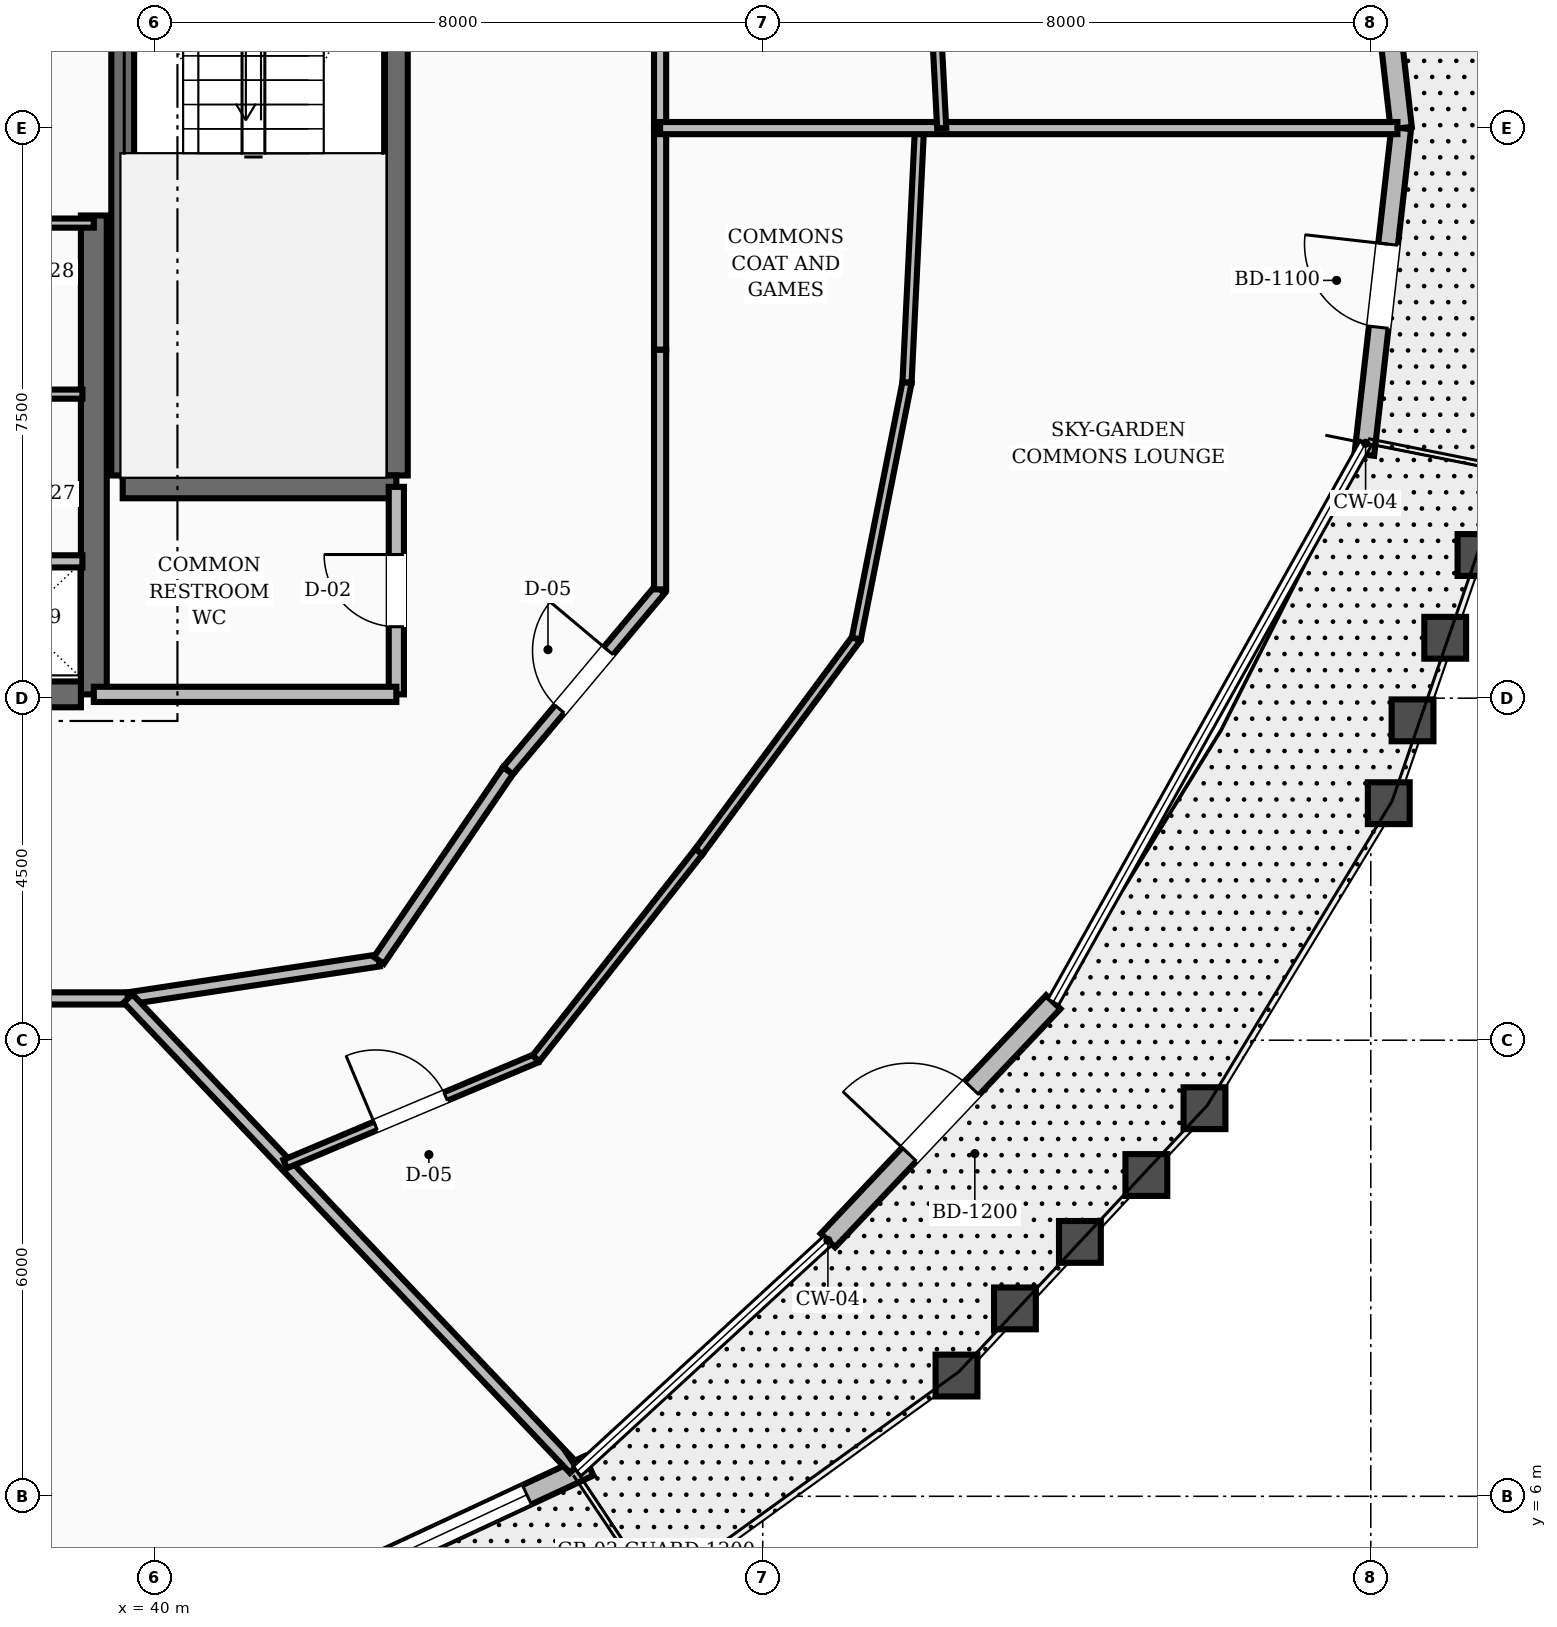
"""IFC4 building model, lengths in metres.
Left out: names, types, materials, properties, quantities, classifications, styles, units other than length and angle.
Written with IfcOpenShell. Run it as: python <this file> out.ifc"""

import sys

from ifc_helpers import new_model, si_unit, direction, frame, frame_2d, origin, place, context, subcontext, project, spatial, rectangle, extrude, element, fill, save


model = new_model("IFC4")
c1 = context("Model", 3, precision=1e-05, world=origin(), true_north=direction((0.0, 1.0)))
c2 = subcontext(c1, "Body", "Model", "MODEL_VIEW")
j1 = project(units=[si_unit("LENGTHUNIT", "METRE"), si_unit("PLANEANGLEUNIT", "RADIAN")], contexts=[c1])
p1 = place(None, origin())
s1 = spatial("IfcSite", under=j1, at=p1, CompositionType="ELEMENT")
p2 = place(p1, origin())
s2 = spatial("IfcBuilding", under=s1, at=p2, CompositionType="ELEMENT")
p3 = place(p2, frame((0.0, 0.0, 200.0)))
s3 = spatial("IfcBuildingStorey", under=s2, at=p3, CompositionType="ELEMENT", Elevation=200.0)
p4 = place(p3, frame((39.2, 16.55, 0.0), z_axis=(0.0, 0.0, 1.0), x_axis=(0.0, 1.0, 0.0)))
e1 = element("IfcWall", 1, at=p4, inside=s3, PredefinedType="SHEAR", context=c2, shape_type="SweptSolid", body=[
    extrude(rectangle(XDim=6.3, YDim=0.34, at=frame_2d((3.15, 0.0))), origin(), (0.0, 0.0, 1.0), 3.6),
])
p5 = place(p3, frame((35.8, 16.55, 0.0), z_axis=(0.0, 0.0, 1.0), x_axis=(1.0, 0.0, 0.0)))
e2 = element("IfcWall", 2, at=p5, inside=s3, PredefinedType="SHEAR", context=c2, shape_type="SweptSolid", body=[
    extrude(rectangle(XDim=3.23, YDim=0.34, at=frame_2d((1.615, 0.0))), origin(), (0.0, 0.0, 1.0), 3.6),
])
p6 = place(p5, frame((0.3, 0.0, 0.0)))
e3 = element("IfcOpeningElement", 3, at=p6, cuts=e2, PredefinedType="OPENING", context=c2, shape_type="SweptSolid", body=[
    extrude(rectangle(XDim=1.1, YDim=2.1, at=frame_2d((0.55, 1.05))), frame((0.0, 0.18, 0.0), z_axis=(0.0, -1.0, 0.0), x_axis=(1.0, 0.0, 0.0)), (0.0, 0.0, 1.0), 0.36),
])
for number, where, z_axis, x_axis in (
    (4, (43.18, 19.43, 0.0), (0.0, 0.0, 1.0), (0.0, 1.0, 0.0)),
    (5, (39.58, 19.43, 0.0), (0.0, 0.0, 1.0), (0.0, 1.0, 0.0)),
):
    element("IfcWall", number, at=place(p3, frame(where, z_axis=z_axis, x_axis=x_axis)), inside=s3, PredefinedType="SHEAR", context=c2, shape_type="SweptSolid", body=[
        extrude(rectangle(XDim=8.74, YDim=0.3, at=frame_2d((4.37, 0.0))), origin(), (0.0, 0.0, 1.0), 3.6),
    ])
p7 = place(p3, frame((39.58, 19.28, 0.0), z_axis=(0.0, 0.0, 1.0), x_axis=(1.0, 0.0, 0.0)))
e6 = element("IfcWall", 6, at=p7, inside=s3, PredefinedType="SHEAR", context=c2, shape_type="SweptSolid", body=[
    extrude(rectangle(XDim=3.6, YDim=0.3, at=frame_2d((1.8, 0.0))), origin(), (0.0, 0.0, 1.0), 3.6),
])
p8 = place(p3, frame((56.4, 24.0, 0.0), z_axis=(0.0, 0.0, 1.0), x_axis=(-0.112325534702, 0.99367146193, 0.0)))
e7 = element("IfcWall", 7, at=p8, inside=s3, PredefinedType="STANDARD", context=c2, shape_type="SweptSolid", body=[
    extrude(rectangle(XDim=4.173, YDim=0.28, at=frame_2d((2.086, 0.0))), origin(), (0.0, 0.0, 1.0), 2.77),
])
p9 = place(p3, frame((41.338, 4.363, 0.0), z_axis=(0.0, 0.0, 1.0), x_axis=(0.906549700707, 0.422099088068, 0.0)))
e8 = element("IfcWall", 8, at=p9, inside=s3, PredefinedType="STANDARD", context=c2, shape_type="SweptSolid", body=[
    extrude(rectangle(XDim=4.828, YDim=0.28, at=frame_2d((2.414, 0.0))), origin(), (0.0, 0.0, 1.0), 2.77),
])
p10 = place(p9, frame((0.727, 0.0, 0.8)))
e9 = element("IfcOpeningElement", 9, at=p10, cuts=e8, PredefinedType="OPENING", context=c2, shape_type="SweptSolid", body=[
    extrude(rectangle(XDim=3.2, YDim=1.65, at=frame_2d((1.6, 0.825))), frame((0.0, 0.15, 0.0), z_axis=(0.0, -1.0, 0.0), x_axis=(1.0, 0.0, 0.0)), (0.0, 0.0, 1.0), 0.3),
])
p11 = place(p3, frame((48.858, 9.366, 0.0), z_axis=(0.0, 0.0, 1.0), x_axis=(0.686972279874, 0.726683622139, 0.0)))
e10 = element("IfcWall", 10, at=p11, inside=s3, PredefinedType="STANDARD", context=c2, shape_type="SweptSolid", body=[
    extrude(rectangle(XDim=4.316, YDim=0.26, at=frame_2d((2.158, 0.0))), origin(), (0.0, 0.0, 1.0), 2.77),
])
p12 = place(p11, frame((1.558, 0.0, 0.0)))
e11 = element("IfcOpeningElement", 11, at=p12, cuts=e10, PredefinedType="OPENING", context=c2, shape_type="SweptSolid", body=[
    extrude(rectangle(XDim=1.2, YDim=2.15, at=frame_2d((0.6, 1.075))), frame((0.0, 0.14, 0.0), z_axis=(0.0, -1.0, 0.0), x_axis=(1.0, 0.0, 0.0)), (0.0, 0.0, 1.0), 0.28),
])
p13 = place(p3, frame((55.915, 19.703, 0.0), z_axis=(0.0, 0.0, 1.0), x_axis=(0.112302837685, 0.993674027359, 0.0)))
e12 = element("IfcWall", 12, at=p13, inside=s3, PredefinedType="STANDARD", context=c2, shape_type="SweptSolid", body=[
    extrude(rectangle(XDim=4.324, YDim=0.26, at=frame_2d((2.162, 0.0))), origin(), (0.0, 0.0, 1.0), 2.77),
])
p14 = place(p13, frame((1.688, 0.0, 0.0)))
e13 = element("IfcOpeningElement", 13, at=p14, cuts=e12, PredefinedType="OPENING", context=c2, shape_type="SweptSolid", body=[
    extrude(rectangle(XDim=1.1, YDim=2.15, at=frame_2d((0.55, 1.075))), frame((0.0, 0.14, 0.0), z_axis=(0.0, -1.0, 0.0), x_axis=(1.0, 0.0, 0.0)), (0.0, 0.0, 1.0), 0.28),
])
p15 = place(p3, frame((43.18, 16.55, 0.0), z_axis=(0.0, 0.0, 1.0), x_axis=(0.0, 1.0, 0.0)))
e14 = element("IfcWall", 14, at=p15, inside=s3, PredefinedType="SOLIDWALL", context=c2, shape_type="SweptSolid", body=[
    extrude(rectangle(XDim=2.73, YDim=0.2, at=frame_2d((1.365, 0.0))), origin(), (0.0, 0.0, 1.0), 2.75),
])
p16 = place(p15, frame((0.89, 0.0, 0.0)))
e15 = element("IfcOpeningElement", 15, at=p16, cuts=e14, PredefinedType="OPENING", context=c2, shape_type="SweptSolid", body=[
    extrude(rectangle(XDim=0.95, YDim=2.1, at=frame_2d((0.475, 1.05))), frame((0.0, 0.11, 0.0), z_axis=(0.0, -1.0, 0.0), x_axis=(1.0, 0.0, 0.0)), (0.0, 0.0, 1.0), 0.22),
])
p17 = place(p3, frame((39.2, 16.55, 0.0), z_axis=(0.0, 0.0, 1.0), x_axis=(1.0, 0.0, 0.0)))
e16 = element("IfcWall", 16, at=p17, inside=s3, PredefinedType="SOLIDWALL", context=c2, shape_type="SweptSolid", body=[
    extrude(rectangle(XDim=3.98, YDim=0.2, at=frame_2d((1.99, 0.0))), origin(), (0.0, 0.0, 1.0), 2.75),
])
p18 = place(p3, frame((37.4, 18.3, 0.0), z_axis=(0.0, 0.0, 1.0), x_axis=(1.0, 0.0, 0.0)))
e17 = element("IfcWall", 17, at=p18, inside=s3, PredefinedType="SOLIDWALL", context=c2, shape_type="SweptSolid", body=[
    extrude(rectangle(XDim=1.65, YDim=0.16, at=frame_2d((0.825, 0.0))), origin(), (0.0, 0.0, 1.0), 2.75),
])
p19 = place(p3, frame((37.4, 22.75, 0.0), z_axis=(0.0, 0.0, 1.0), x_axis=(1.0, 0.0, 0.0)))
e18 = element("IfcWall", 18, at=p19, inside=s3, PredefinedType="PARTITIONING", context=c2, shape_type="SweptSolid", body=[
    extrude(rectangle(XDim=1.8, YDim=0.12, at=frame_2d((0.9, 0.0))), origin(), (0.0, 0.0, 1.0), 2.75),
])
p20 = place(p3, frame((37.4, 20.5, 0.0), z_axis=(0.0, 0.0, 1.0), x_axis=(1.0, 0.0, 0.0)))
e19 = element("IfcWall", 19, at=p20, inside=s3, PredefinedType="PARTITIONING", context=c2, shape_type="SweptSolid", body=[
    extrude(rectangle(XDim=1.65, YDim=0.12, at=frame_2d((0.825, 0.0))), origin(), (0.0, 0.0, 1.0), 2.75),
])
p21 = place(p3, frame((46.65, 24.0, 0.0), z_axis=(0.0, 0.0, 1.0), x_axis=(0.0, 1.0, 0.0)))
e20 = element("IfcWall", 20, at=p21, inside=s3, PredefinedType="SOLIDWALL", context=c2, shape_type="SweptSolid", body=[
    extrude(rectangle(XDim=2.914, YDim=0.16, at=frame_2d((1.457, 0.0))), origin(), (0.0, 0.0, 1.0), 2.75),
])
p22 = place(p3, frame((36.743, 12.55, 0.0), z_axis=(0.0, 0.0, 1.0), x_axis=(1.0, 0.0, 0.0)))
e21 = element("IfcWall", 21, at=p22, inside=s3, PredefinedType="SOLIDWALL", context=c2, shape_type="SweptSolid", body=[
    extrude(rectangle(XDim=2.908, YDim=0.16, at=frame_2d((1.454, 0.0))), origin(), (0.0, 0.0, 1.0), 2.75),
])
p23 = place(p3, frame((39.651, 12.55, 0.0), z_axis=(0.0, 0.0, 1.0), x_axis=(0.988710906508, 0.149835721217, 0.0)))
e22 = element("IfcWall", 22, at=p23, inside=s3, PredefinedType="SOLIDWALL", context=c2, shape_type="SweptSolid", body=[
    extrude(rectangle(XDim=3.337, YDim=0.16, at=frame_2d((1.668, 0.0))), origin(), (0.0, 0.0, 1.0), 2.75),
])
p24 = place(p3, frame((42.95, 13.05, 0.0), z_axis=(0.0, 0.0, 1.0), x_axis=(0.562674669208, 0.826678423955, 0.0)))
e23 = element("IfcWall", 23, at=p24, inside=s3, PredefinedType="SOLIDWALL", context=c2, shape_type="SweptSolid", body=[
    extrude(rectangle(XDim=3.021, YDim=0.16, at=frame_2d((1.511, 0.0))), origin(), (0.0, 0.0, 1.0), 2.75),
])
p25 = place(p3, frame((44.65, 15.548, 0.0), z_axis=(0.0, 0.0, 1.0), x_axis=(0.642665742791, 0.76614668507, 0.0)))
e24 = element("IfcWall", 24, at=p25, inside=s3, PredefinedType="SOLIDWALL", context=c2, shape_type="SweptSolid", body=[
    extrude(rectangle(XDim=3.112, YDim=0.16, at=frame_2d((1.556, 0.0))), origin(), (0.0, 0.0, 1.0), 2.75),
])
p26 = place(p25, frame((1.056, 0.0, 0.0)))
e25 = element("IfcOpeningElement", 25, at=p26, cuts=e24, PredefinedType="OPENING", context=c2, shape_type="SweptSolid", body=[
    extrude(rectangle(XDim=1.0, YDim=2.1, at=frame_2d((0.5, 1.05))), frame((0.0, 0.09, 0.0), z_axis=(0.0, -1.0, 0.0), x_axis=(1.0, 0.0, 0.0)), (0.0, 0.0, 1.0), 0.18),
])
p27 = place(p3, frame((46.65, 17.932, 0.0), z_axis=(0.0, 0.0, 1.0), x_axis=(0.0, 1.0, 0.0)))
e26 = element("IfcWall", 26, at=p27, inside=s3, PredefinedType="SOLIDWALL", context=c2, shape_type="SweptSolid", body=[
    extrude(rectangle(XDim=3.154, YDim=0.16, at=frame_2d((1.577, 0.0))), origin(), (0.0, 0.0, 1.0), 2.75),
])
p28 = place(p3, frame((46.65, 21.086, 0.0), z_axis=(0.0, 0.0, 1.0), x_axis=(0.0, 1.0, 0.0)))
e27 = element("IfcWall", 27, at=p28, inside=s3, PredefinedType="SOLIDWALL", context=c2, shape_type="SweptSolid", body=[
    extrude(rectangle(XDim=2.914, YDim=0.16, at=frame_2d((1.457, 0.0))), origin(), (0.0, 0.0, 1.0), 2.75),
])
p29 = place(p3, frame((39.651, 12.55, 0.0), z_axis=(0.0, 0.0, 1.0), x_axis=(0.688358927094, -0.725370241662, 0.0)))
e28 = element("IfcWall", 28, at=p29, inside=s3, PredefinedType="SOLIDWALL", context=c2, shape_type="SweptSolid", body=[
    extrude(rectangle(XDim=8.529, YDim=0.16, at=frame_2d((4.265, 0.0))), origin(), (0.0, 0.0, 1.0), 2.75),
])
p30 = place(p3, frame((41.718, 10.372, 0.0), z_axis=(0.0, 0.0, 1.0), x_axis=(0.921693123921, 0.387919818154, 0.0)))
e29 = element("IfcWall", 29, at=p30, inside=s3, PredefinedType="PARTITIONING", context=c2, shape_type="SweptSolid", body=[
    extrude(rectangle(XDim=3.58, YDim=0.12, at=frame_2d((1.79, 0.0))), origin(), (0.0, 0.0, 1.0), 2.75),
])
p31 = place(p30, frame((1.29, 0.0, 0.0)))
e30 = element("IfcOpeningElement", 30, at=p31, cuts=e29, PredefinedType="OPENING", context=c2, shape_type="SweptSolid", body=[
    extrude(rectangle(XDim=1.0, YDim=2.1, at=frame_2d((0.5, 1.05))), frame((0.0, 0.07, 0.0), z_axis=(0.0, -1.0, 0.0), x_axis=(1.0, 0.0, 0.0)), (0.0, 0.0, 1.0), 0.14),
])
p32 = place(p3, frame((45.018, 11.761, 0.0), z_axis=(0.0, 0.0, 1.0), x_axis=(0.618702194265, 0.785625607278, 0.0)))
e31 = element("IfcWall", 31, at=p32, inside=s3, PredefinedType="PARTITIONING", context=c2, shape_type="SweptSolid", body=[
    extrude(rectangle(XDim=3.463, YDim=0.12, at=frame_2d((1.732, 0.0))), origin(), (0.0, 0.0, 1.0), 2.75),
])
p33 = place(p3, frame((47.16, 14.482, 0.0), z_axis=(0.0, 0.0, 1.0), x_axis=(0.594391061084, 0.804176141466, 0.0)))
e32 = element("IfcWall", 32, at=p33, inside=s3, PredefinedType="PARTITIONING", context=c2, shape_type="SweptSolid", body=[
    extrude(rectangle(XDim=3.484, YDim=0.12, at=frame_2d((1.742, 0.0))), origin(), (0.0, 0.0, 1.0), 2.75),
])
p34 = place(p3, frame((49.231, 17.284, 0.0), z_axis=(0.0, 0.0, 1.0), x_axis=(0.194175580381, 0.980966790459, 0.0)))
e33 = element("IfcWall", 33, at=p34, inside=s3, PredefinedType="PARTITIONING", context=c2, shape_type="SweptSolid", body=[
    extrude(rectangle(XDim=3.436, YDim=0.12, at=frame_2d((1.718, 0.0))), origin(), (0.0, 0.0, 1.0), 2.75),
])
p35 = place(p3, frame((49.899, 20.655, 0.0), z_axis=(0.0, 0.0, 1.0), x_axis=(0.048981492316, 0.998799686329, 0.0)))
e34 = element("IfcWall", 34, at=p35, inside=s3, PredefinedType="PARTITIONING", context=c2, shape_type="SweptSolid", body=[
    extrude(rectangle(XDim=3.349, YDim=0.12, at=frame_2d((1.675, 0.0))), origin(), (0.0, 0.0, 1.0), 2.75),
])
p36 = place(p3, frame((46.65, 24.0, 0.0), z_axis=(0.0, 0.0, 1.0), x_axis=(1.0, 0.0, 0.0)))
e35 = element("IfcWall", 35, at=p36, inside=s3, PredefinedType="SOLIDWALL", context=c2, shape_type="SweptSolid", body=[
    extrude(rectangle(XDim=9.701, YDim=0.16, at=frame_2d((4.85, 0.0))), origin(), (0.0, 0.0, 1.0), 2.75),
])
p37 = place(p3, frame((50.355, 24.0, 0.0), z_axis=(0.0, 0.0, 1.0), x_axis=(-0.052615578061, 0.99861484114, 0.0)))
e36 = element("IfcWall", 36, at=p37, inside=s3, PredefinedType="PARTITIONING", context=c2, shape_type="SweptSolid", body=[
    extrude(rectangle(XDim=3.387, YDim=0.12, at=frame_2d((1.694, 0.0))), origin(), (0.0, 0.0, 1.0), 2.75),
])
p38 = place(p37, frame((1.264, 0.0, 0.0)))
e37 = element("IfcOpeningElement", 37, at=p38, cuts=e36, PredefinedType="OPENING", context=c2, shape_type="SweptSolid", body=[
    extrude(rectangle(XDim=0.86, YDim=2.1, at=frame_2d((0.43, 1.05))), frame((0.0, 0.07, 0.0), z_axis=(0.0, -1.0, 0.0), x_axis=(1.0, 0.0, 0.0)), (0.0, 0.0, 1.0), 0.14),
])
p39 = place(p10, origin())
e38 = element("IfcWindow", 38, at=p39, inside=s3, PartitioningType="SINGLE_PANEL", PredefinedType="WINDOW", context=c2, shape_type="SweptSolid", body=[
    extrude(rectangle(XDim=3.2, YDim=1.65, at=frame_2d((1.6, 0.825))), frame((0.0, 0.03, 0.0), z_axis=(0.0, -1.0, 0.0), x_axis=(1.0, 0.0, 0.0)), (0.0, 0.0, 1.0), 0.06),
])
fill(e9, e38)
p40 = place(p12, origin())
e39 = element("IfcDoor", 39, at=p40, inside=s3, OperationType="SINGLE_SWING_LEFT", PredefinedType="DOOR", context=c2, shape_type="SweptSolid", body=[
    extrude(rectangle(XDim=1.2, YDim=2.15, at=frame_2d((0.6, 1.075))), frame((0.0, 0.025, 0.0), z_axis=(0.0, -1.0, 0.0), x_axis=(1.0, 0.0, 0.0)), (0.0, 0.0, 1.0), 0.05),
])
fill(e11, e39)
p41 = place(p14, origin())
e40 = element("IfcDoor", 40, at=p41, inside=s3, OperationType="SINGLE_SWING_RIGHT", PredefinedType="DOOR", context=c2, shape_type="SweptSolid", body=[
    extrude(rectangle(XDim=1.1, YDim=2.15, at=frame_2d((0.55, 1.075))), frame((0.0, 0.025, 0.0), z_axis=(0.0, -1.0, 0.0), x_axis=(1.0, 0.0, 0.0)), (0.0, 0.0, 1.0), 0.05),
])
fill(e13, e40)
p42 = place(p16, origin())
e41 = element("IfcDoor", 41, at=p42, inside=s3, OperationType="SINGLE_SWING_RIGHT", PredefinedType="DOOR", context=c2, shape_type="SweptSolid", body=[
    extrude(rectangle(XDim=0.95, YDim=2.1, at=frame_2d((0.475, 1.05))), frame((0.0, 0.025, 0.0), z_axis=(0.0, -1.0, 0.0), x_axis=(1.0, 0.0, 0.0)), (0.0, 0.0, 1.0), 0.05),
])
fill(e15, e41)
p43 = place(p26, origin())
e42 = element("IfcDoor", 42, at=p43, inside=s3, OperationType="SINGLE_SWING_RIGHT", PredefinedType="DOOR", context=c2, shape_type="SweptSolid", body=[
    extrude(rectangle(XDim=1.0, YDim=2.1, at=frame_2d((0.5, 1.05))), frame((0.0, 0.025, 0.0), z_axis=(0.0, -1.0, 0.0), x_axis=(1.0, 0.0, 0.0)), (0.0, 0.0, 1.0), 0.05),
])
fill(e25, e42)
p44 = place(p31, origin())
e43 = element("IfcDoor", 43, at=p44, inside=s3, OperationType="SINGLE_SWING_LEFT", PredefinedType="DOOR", context=c2, shape_type="SweptSolid", body=[
    extrude(rectangle(XDim=1.0, YDim=2.1, at=frame_2d((0.5, 1.05))), frame((0.0, 0.025, 0.0), z_axis=(0.0, -1.0, 0.0), x_axis=(1.0, 0.0, 0.0)), (0.0, 0.0, 1.0), 0.05),
])
fill(e30, e43)
save(model, sys.argv[1])
